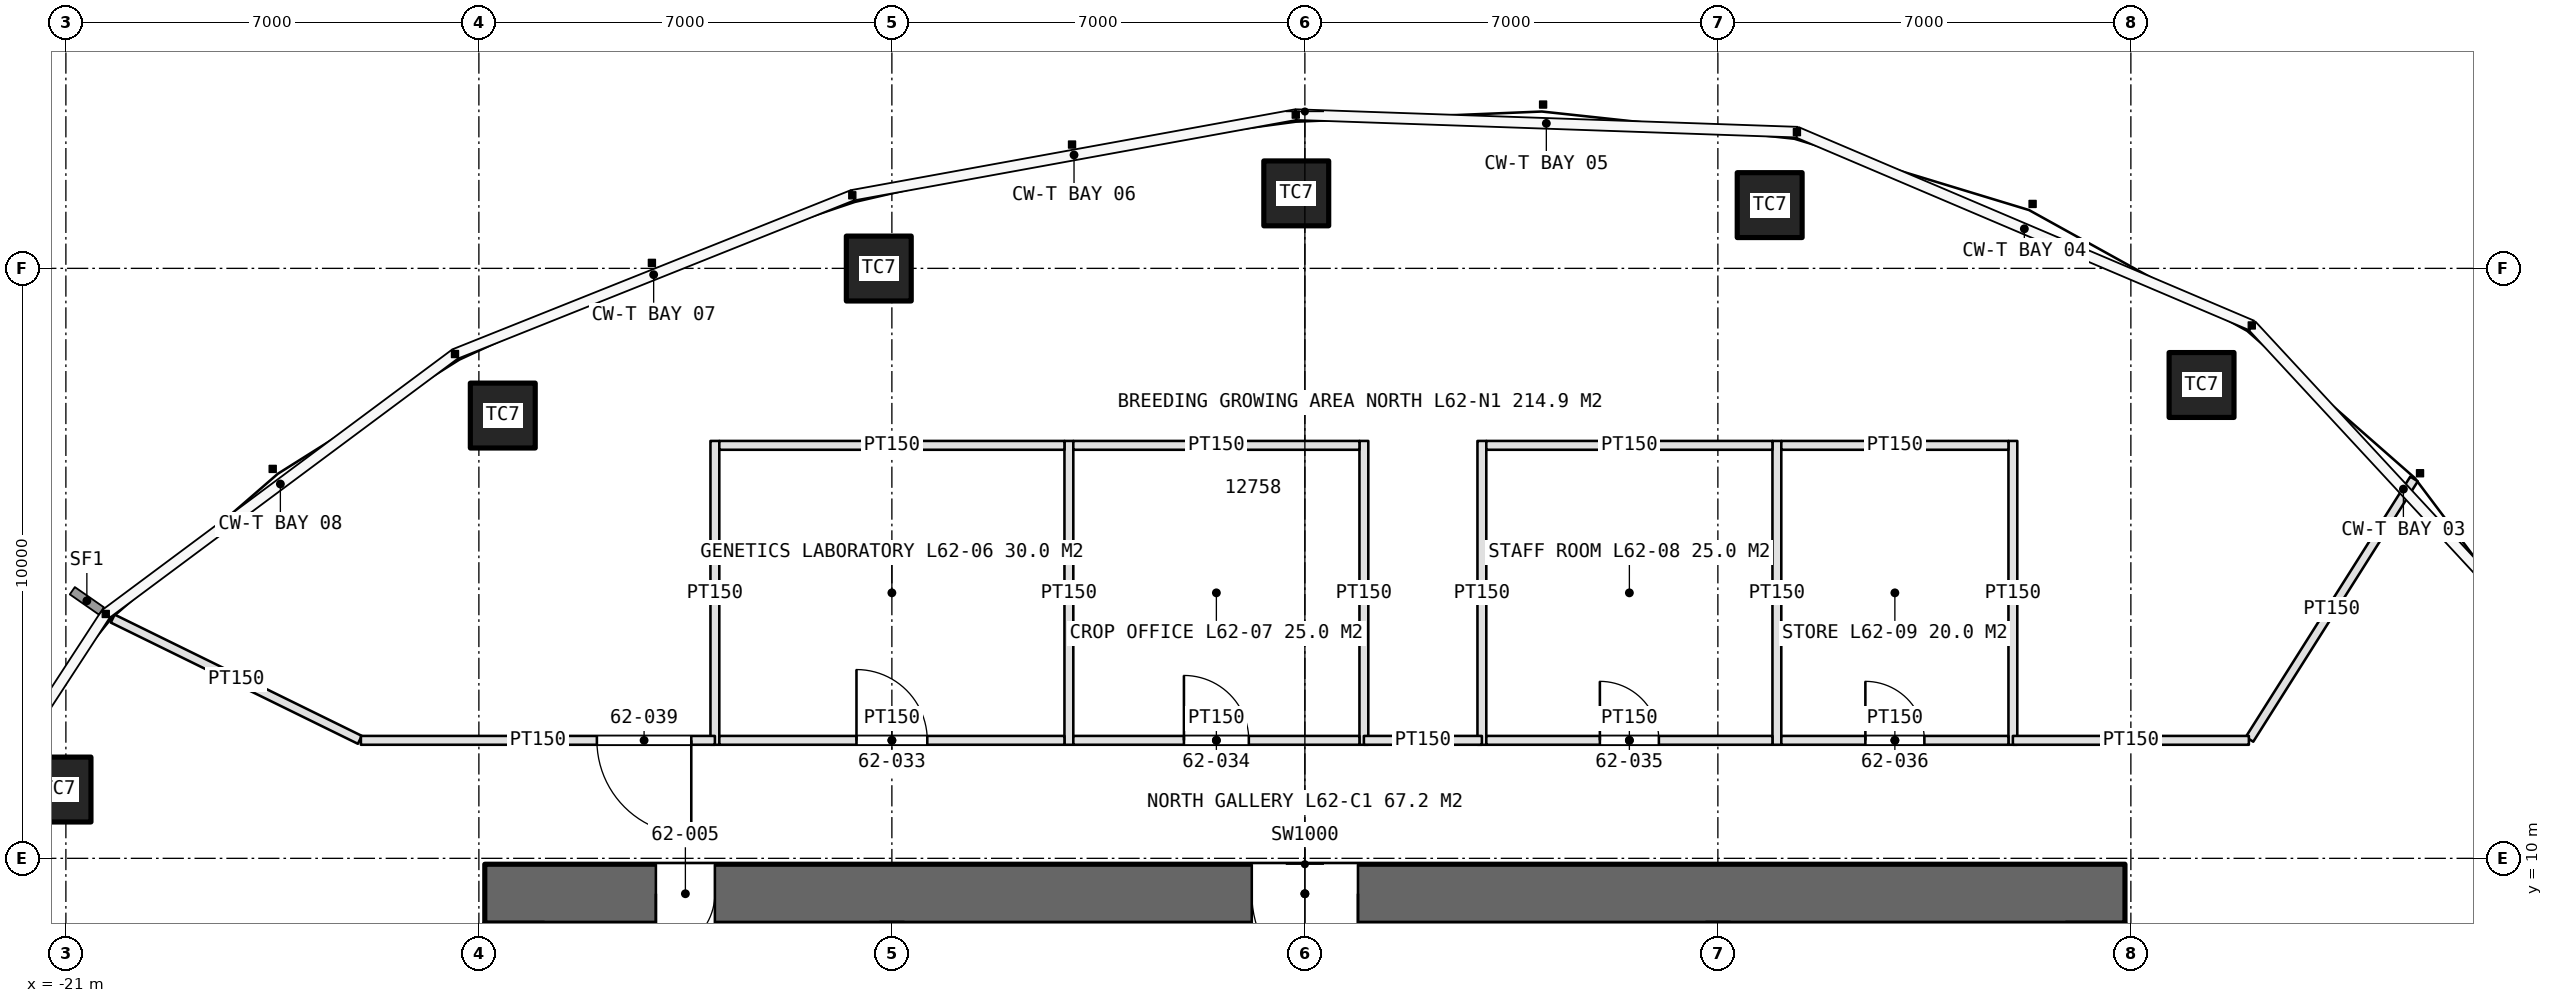
"""IFC4 building model, lengths in metres.
Left out: names, types, materials, properties, quantities, classifications, styles, units other than length and angle.
Written with IfcOpenShell. Run it as: python <this file> out.ifc"""

import sys

from ifc_helpers import new_model, si_unit, direction, frame, frame_2d, origin, origin_2d, place, context, subcontext, project, spatial, rectangle, extrude, element, fill, save


model = new_model("IFC4")
c1 = context("Model", 3, precision=1e-05, world=origin(), true_north=direction((0.0, 1.0)))
c2 = subcontext(c1, "Body", "Model", "MODEL_VIEW")
j1 = project(units=[si_unit("LENGTHUNIT", "METRE"), si_unit("PLANEANGLEUNIT", "RADIAN")], contexts=[c1])
p1 = place(None, origin())
s1 = spatial("IfcSite", under=j1, at=p1, CompositionType="ELEMENT")
p2 = place(p1, origin())
s2 = spatial("IfcBuilding", under=s1, at=p2, CompositionType="ELEMENT")
p3 = place(p2, frame((0.0, 0.0, 279.6)))
s3 = spatial("IfcBuildingStorey", under=s2, at=p3, CompositionType="ELEMENT", Elevation=279.6)
p4 = place(p3, frame((13.9, 9.4, 0.0), z_axis=(0.0, 0.0, 1.0), x_axis=(-1.0, 0.0, 0.0)))
e1 = element("IfcWall", 1, at=p4, inside=s3, PredefinedType="SHEAR", context=c2, shape_type="SweptSolid", body=[
    extrude(rectangle(XDim=27.8, YDim=1.0, at=frame_2d((13.9, 0.0))), origin(), (0.0, 0.0, 1.0), 4.2),
])
p5 = place(p4, frame((23.9, 0.0, 0.0)))
e2 = element("IfcOpeningElement", 2, at=p5, cuts=e1, PredefinedType="OPENING", context=c2, shape_type="SweptSolid", body=[
    extrude(rectangle(XDim=1.0, YDim=2.4, at=frame_2d((0.5, 1.2))), frame((0.0, 0.51, 0.0), z_axis=(0.0, -1.0, 0.0), x_axis=(1.0, 0.0, 0.0)), (0.0, 0.0, 1.0), 1.02),
])
p6 = place(p4, frame((13.0, 0.0, 0.0)))
e3 = element("IfcOpeningElement", 3, at=p6, cuts=e1, PredefinedType="OPENING", context=c2, shape_type="SweptSolid", body=[
    extrude(rectangle(XDim=1.8, YDim=2.4, at=frame_2d((0.9, 1.2))), frame((0.0, 0.51, 0.0), z_axis=(0.0, -1.0, 0.0), x_axis=(1.0, 0.0, 0.0)), (0.0, 0.0, 1.0), 1.02),
])
for number, where, z_axis, x_axis in (
    (4, (15.198, 18.023, 0.0), (0.0, 0.0, 1.0), (1.0, 0.0, 0.0)),
    (5, (7.878, 21.072, 0.0), (0.0, 0.0, 1.0), (1.0, 0.0, 0.0)),
    (6, (-0.146, 21.271, 0.0), (0.0, 0.0, 1.0), (1.0, 0.0, 0.0)),
    (7, (-7.222, 19.997, 0.0), (0.0, 0.0, 1.0), (1.0, 0.0, 0.0)),
    (8, (-13.595, 17.505, 0.0), (0.0, 0.0, 1.0), (1.0, 0.0, 0.0)),
    (9, (-21.125, 11.166, 0.0), (0.0, 0.0, 1.0), (1.0, 0.0, 0.0)),
):
    element("IfcColumn", number, at=place(p3, frame(where, z_axis=z_axis, x_axis=x_axis)), inside=s3, PredefinedType="COLUMN", context=c2, shape_type="SweptSolid", body=[
        extrude(rectangle(XDim=1.1, YDim=1.1, at=origin_2d()), origin(), (0.0, 0.0, 1.0), 4.2),
    ])
for number, where, z_axis, x_axis in (
    (10, (-10.0, 11.925, 0.0), (0.0, 0.0, 1.0), (0.0, 1.0, 0.0)),
    (11, (-4.0, 11.925, 0.0), (0.0, 0.0, 1.0), (0.0, 1.0, 0.0)),
    (12, (1.0, 11.925, 0.0), (0.0, 0.0, 1.0), (0.0, 1.0, 0.0)),
):
    element("IfcWall", number, at=place(p3, frame(where, z_axis=z_axis, x_axis=x_axis)), inside=s3, PredefinedType="PARTITIONING", context=c2, shape_type="SweptSolid", body=[
        extrude(rectangle(XDim=5.15, YDim=0.15, at=frame_2d((2.575, 0.0))), origin(), (0.0, 0.0, 1.0), 3.0),
    ])
p7 = place(p3, frame((-9.925, 12.0, 0.0), z_axis=(0.0, 0.0, 1.0), x_axis=(1.0, 0.0, 0.0)))
e13 = element("IfcWall", 13, at=p7, inside=s3, PredefinedType="PARTITIONING", context=c2, shape_type="SweptSolid", body=[
    extrude(rectangle(XDim=5.85, YDim=0.15, at=frame_2d((2.925, 0.0))), origin(), (0.0, 0.0, 1.0), 3.0),
])
p8 = place(p7, frame((2.325, 0.0, 0.0)))
e14 = element("IfcOpeningElement", 14, at=p8, cuts=e13, PredefinedType="OPENING", context=c2, shape_type="SweptSolid", body=[
    extrude(rectangle(XDim=1.2, YDim=2.3, at=frame_2d((0.6, 1.15))), frame((0.0, 0.085, 0.0), z_axis=(0.0, -1.0, 0.0), x_axis=(1.0, 0.0, 0.0)), (0.0, 0.0, 1.0), 0.17),
])
p9 = place(p3, frame((-9.925, 17.0, 0.0), z_axis=(0.0, 0.0, 1.0), x_axis=(1.0, 0.0, 0.0)))
e15 = element("IfcWall", 15, at=p9, inside=s3, PredefinedType="PARTITIONING", context=c2, shape_type="SweptSolid", body=[
    extrude(rectangle(XDim=5.85, YDim=0.15, at=frame_2d((2.925, 0.0))), origin(), (0.0, 0.0, 1.0), 3.0),
])
p10 = place(p3, frame((-3.925, 12.0, 0.0), z_axis=(0.0, 0.0, 1.0), x_axis=(1.0, 0.0, 0.0)))
e16 = element("IfcWall", 16, at=p10, inside=s3, PredefinedType="PARTITIONING", context=c2, shape_type="SweptSolid", body=[
    extrude(rectangle(XDim=4.85, YDim=0.15, at=frame_2d((2.425, 0.0))), origin(), (0.0, 0.0, 1.0), 3.0),
])
p11 = place(p10, frame((1.875, 0.0, 0.0)))
e17 = element("IfcOpeningElement", 17, at=p11, cuts=e16, PredefinedType="OPENING", context=c2, shape_type="SweptSolid", body=[
    extrude(rectangle(XDim=1.1, YDim=2.3, at=frame_2d((0.55, 1.15))), frame((0.0, 0.085, 0.0), z_axis=(0.0, -1.0, 0.0), x_axis=(1.0, 0.0, 0.0)), (0.0, 0.0, 1.0), 0.17),
])
p12 = place(p3, frame((-3.925, 17.0, 0.0), z_axis=(0.0, 0.0, 1.0), x_axis=(1.0, 0.0, 0.0)))
e18 = element("IfcWall", 18, at=p12, inside=s3, PredefinedType="PARTITIONING", context=c2, shape_type="SweptSolid", body=[
    extrude(rectangle(XDim=4.85, YDim=0.15, at=frame_2d((2.425, 0.0))), origin(), (0.0, 0.0, 1.0), 3.0),
])
for number, where, z_axis, x_axis in (
    (19, (3.0, 11.925, 0.0), (0.0, 0.0, 1.0), (0.0, 1.0, 0.0)),
    (20, (8.0, 11.925, 0.0), (0.0, 0.0, 1.0), (0.0, 1.0, 0.0)),
    (21, (12.0, 11.925, 0.0), (0.0, 0.0, 1.0), (0.0, 1.0, 0.0)),
):
    element("IfcWall", number, at=place(p3, frame(where, z_axis=z_axis, x_axis=x_axis)), inside=s3, PredefinedType="PARTITIONING", context=c2, shape_type="SweptSolid", body=[
        extrude(rectangle(XDim=5.15, YDim=0.15, at=frame_2d((2.575, 0.0))), origin(), (0.0, 0.0, 1.0), 3.0),
    ])
p13 = place(p3, frame((3.075, 12.0, 0.0), z_axis=(0.0, 0.0, 1.0), x_axis=(1.0, 0.0, 0.0)))
e22 = element("IfcWall", 22, at=p13, inside=s3, PredefinedType="PARTITIONING", context=c2, shape_type="SweptSolid", body=[
    extrude(rectangle(XDim=4.85, YDim=0.15, at=frame_2d((2.425, 0.0))), origin(), (0.0, 0.0, 1.0), 3.0),
])
p14 = place(p13, frame((1.925, 0.0, 0.0)))
e23 = element("IfcOpeningElement", 23, at=p14, cuts=e22, PredefinedType="OPENING", context=c2, shape_type="SweptSolid", body=[
    extrude(rectangle(XDim=1.0, YDim=2.2, at=frame_2d((0.5, 1.1))), frame((0.0, 0.085, 0.0), z_axis=(0.0, -1.0, 0.0), x_axis=(1.0, 0.0, 0.0)), (0.0, 0.0, 1.0), 0.17),
])
p15 = place(p3, frame((3.075, 17.0, 0.0), z_axis=(0.0, 0.0, 1.0), x_axis=(1.0, 0.0, 0.0)))
e24 = element("IfcWall", 24, at=p15, inside=s3, PredefinedType="PARTITIONING", context=c2, shape_type="SweptSolid", body=[
    extrude(rectangle(XDim=4.85, YDim=0.15, at=frame_2d((2.425, 0.0))), origin(), (0.0, 0.0, 1.0), 3.0),
])
p16 = place(p3, frame((8.075, 12.0, 0.0), z_axis=(0.0, 0.0, 1.0), x_axis=(1.0, 0.0, 0.0)))
e25 = element("IfcWall", 25, at=p16, inside=s3, PredefinedType="PARTITIONING", context=c2, shape_type="SweptSolid", body=[
    extrude(rectangle(XDim=3.85, YDim=0.15, at=frame_2d((1.925, 0.0))), origin(), (0.0, 0.0, 1.0), 3.0),
])
p17 = place(p16, frame((1.425, 0.0, 0.0)))
e26 = element("IfcOpeningElement", 26, at=p17, cuts=e25, PredefinedType="OPENING", context=c2, shape_type="SweptSolid", body=[
    extrude(rectangle(XDim=1.0, YDim=2.2, at=frame_2d((0.5, 1.1))), frame((0.0, 0.085, 0.0), z_axis=(0.0, -1.0, 0.0), x_axis=(1.0, 0.0, 0.0)), (0.0, 0.0, 1.0), 0.17),
])
p18 = place(p3, frame((8.075, 17.0, 0.0), z_axis=(0.0, 0.0, 1.0), x_axis=(1.0, 0.0, 0.0)))
e27 = element("IfcWall", 27, at=p18, inside=s3, PredefinedType="PARTITIONING", context=c2, shape_type="SweptSolid", body=[
    extrude(rectangle(XDim=3.85, YDim=0.15, at=frame_2d((1.925, 0.0))), origin(), (0.0, 0.0, 1.0), 3.0),
])
p19 = place(p3, frame((-16.018, 12.009, 0.0), z_axis=(0.0, 0.0, 1.0), x_axis=(-0.897771840996, 0.440460805879, 0.0)))
e28 = element("IfcWall", 28, at=p19, inside=s3, PredefinedType="PARTITIONING", context=c2, shape_type="SweptSolid", body=[
    extrude(rectangle(XDim=4.666, YDim=0.15, at=frame_2d((2.333, 0.0))), origin(), (0.0, 0.0, 1.0), 3.0),
])
p20 = place(p3, frame((16.011, 12.017, 0.0), z_axis=(0.0, 0.0, 1.0), x_axis=(0.53415837449, 0.845384427916, 0.0)))
e29 = element("IfcWall", 29, at=p20, inside=s3, PredefinedType="PARTITIONING", context=c2, shape_type="SweptSolid", body=[
    extrude(rectangle(XDim=5.22, YDim=0.15, at=frame_2d((2.61, 0.0))), origin(), (0.0, 0.0, 1.0), 3.0),
])
p21 = place(p3, frame((-10.0, 12.0, 0.0), z_axis=(0.0, 0.0, 1.0), x_axis=(-1.0, 0.0, 0.0)))
e30 = element("IfcWall", 30, at=p21, inside=s3, PredefinedType="PARTITIONING", context=c2, shape_type="SweptSolid", body=[
    extrude(rectangle(XDim=6.0, YDim=0.15, at=frame_2d((3.0, 0.0))), origin(), (0.0, 0.0, 1.0), 3.0),
])
p22 = place(p21, frame((0.4, 0.0, 0.0)))
e31 = element("IfcOpeningElement", 31, at=p22, cuts=e30, PredefinedType="OPENING", context=c2, shape_type="SweptSolid", body=[
    extrude(rectangle(XDim=1.6, YDim=2.4, at=frame_2d((0.8, 1.2))), frame((0.0, 0.085, 0.0), z_axis=(0.0, -1.0, 0.0), x_axis=(1.0, 0.0, 0.0)), (0.0, 0.0, 1.0), 0.17),
])
p23 = place(p3, frame((3.0, 12.0, 0.0), z_axis=(0.0, 0.0, 1.0), x_axis=(-1.0, 0.0, 0.0)))
e32 = element("IfcWall", 32, at=p23, inside=s3, PredefinedType="PARTITIONING", context=c2, shape_type="SweptSolid", body=[
    extrude(rectangle(XDim=2.0, YDim=0.15, at=frame_2d((1.0, 0.0))), origin(), (0.0, 0.0, 1.0), 3.0),
])
p24 = place(p3, frame((16.0, 12.0, 0.0), z_axis=(0.0, 0.0, 1.0), x_axis=(-1.0, 0.0, 0.0)))
e33 = element("IfcWall", 33, at=p24, inside=s3, PredefinedType="PARTITIONING", context=c2, shape_type="SweptSolid", body=[
    extrude(rectangle(XDim=4.0, YDim=0.15, at=frame_2d((2.0, 0.0))), origin(), (0.0, 0.0, 1.0), 3.0),
])
p25 = place(p5, origin())
e34 = element("IfcDoor", 34, at=p25, inside=s3, OperationType="SINGLE_SWING_RIGHT", PredefinedType="DOOR", context=c2, shape_type="SweptSolid", body=[
    extrude(rectangle(XDim=1.0, YDim=2.4, at=frame_2d((0.5, 1.2))), frame((0.0, 0.025, 0.0), z_axis=(0.0, -1.0, 0.0), x_axis=(1.0, 0.0, 0.0)), (0.0, 0.0, 1.0), 0.05),
])
fill(e2, e34)
p26 = place(p6, origin())
e35 = element("IfcDoor", 35, at=p26, inside=s3, OperationType="DOUBLE_DOOR_SINGLE_SWING", PredefinedType="DOOR", context=c2, shape_type="SweptSolid", body=[
    extrude(rectangle(XDim=1.8, YDim=2.4, at=frame_2d((0.9, 1.2))), frame((0.0, 0.025, 0.0), z_axis=(0.0, -1.0, 0.0), x_axis=(1.0, 0.0, 0.0)), (0.0, 0.0, 1.0), 0.05),
])
fill(e3, e35)
p27 = place(p8, origin())
e36 = element("IfcDoor", 36, at=p27, inside=s3, OperationType="SINGLE_SWING_LEFT", PredefinedType="DOOR", context=c2, shape_type="SweptSolid", body=[
    extrude(rectangle(XDim=1.2, YDim=2.3, at=frame_2d((0.6, 1.15))), frame((0.0, 0.025, 0.0), z_axis=(0.0, -1.0, 0.0), x_axis=(1.0, 0.0, 0.0)), (0.0, 0.0, 1.0), 0.05),
])
fill(e14, e36)
p28 = place(p11, origin())
e37 = element("IfcDoor", 37, at=p28, inside=s3, OperationType="SINGLE_SWING_LEFT", PredefinedType="DOOR", context=c2, shape_type="SweptSolid", body=[
    extrude(rectangle(XDim=1.1, YDim=2.3, at=frame_2d((0.55, 1.15))), frame((0.0, 0.025, 0.0), z_axis=(0.0, -1.0, 0.0), x_axis=(1.0, 0.0, 0.0)), (0.0, 0.0, 1.0), 0.05),
])
fill(e17, e37)
p29 = place(p14, origin())
e38 = element("IfcDoor", 38, at=p29, inside=s3, OperationType="SINGLE_SWING_LEFT", PredefinedType="DOOR", context=c2, shape_type="SweptSolid", body=[
    extrude(rectangle(XDim=1.0, YDim=2.2, at=frame_2d((0.5, 1.1))), frame((0.0, 0.025, 0.0), z_axis=(0.0, -1.0, 0.0), x_axis=(1.0, 0.0, 0.0)), (0.0, 0.0, 1.0), 0.05),
])
fill(e23, e38)
p30 = place(p17, origin())
e39 = element("IfcDoor", 39, at=p30, inside=s3, OperationType="SINGLE_SWING_LEFT", PredefinedType="DOOR", context=c2, shape_type="SweptSolid", body=[
    extrude(rectangle(XDim=1.0, YDim=2.2, at=frame_2d((0.5, 1.1))), frame((0.0, 0.025, 0.0), z_axis=(0.0, -1.0, 0.0), x_axis=(1.0, 0.0, 0.0)), (0.0, 0.0, 1.0), 0.05),
])
fill(e26, e39)
p31 = place(p22, origin())
e40 = element("IfcDoor", 40, at=p31, inside=s3, OperationType="DOUBLE_DOOR_SINGLE_SWING", PredefinedType="DOOR", context=c2, shape_type="SweptSolid", body=[
    extrude(rectangle(XDim=1.6, YDim=2.4, at=frame_2d((0.8, 1.2))), frame((0.0, 0.025, 0.0), z_axis=(0.0, -1.0, 0.0), x_axis=(1.0, 0.0, 0.0)), (0.0, 0.0, 1.0), 0.05),
])
fill(e31, e40)
save(model, sys.argv[1])
